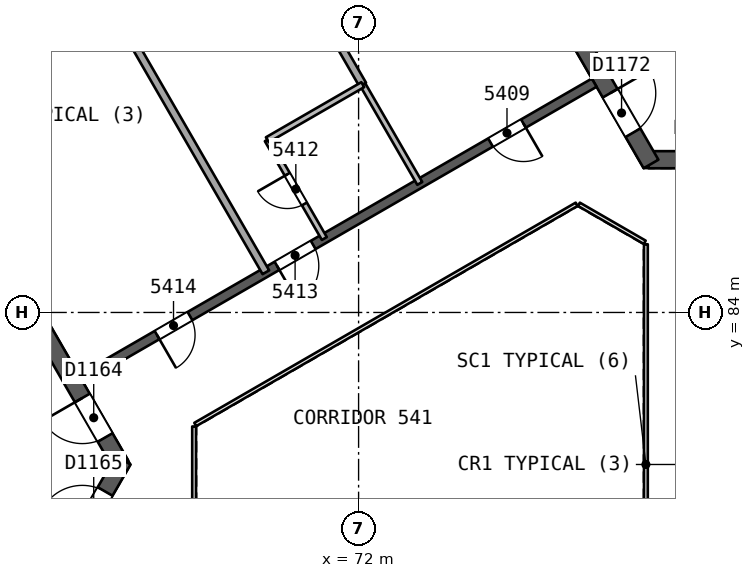
"""IFC4 building model, lengths in metres.
Left out: names, types, materials, properties, quantities, classifications, styles, units other than length and angle.
Written with IfcOpenShell. Run it as: python <this file> out.ifc"""

import sys

from ifc_helpers import new_model, si_unit, direction, frame, frame_2d, origin, place, context, subcontext, project, spatial, rectangle, extrude, element, fill, save


model = new_model("IFC4")
c1 = context("Model", 3, precision=1e-05, world=origin(), true_north=direction((0.0, 1.0)))
c2 = subcontext(c1, "Body", "Model", "MODEL_VIEW")
j1 = project(units=[si_unit("LENGTHUNIT", "METRE"), si_unit("PLANEANGLEUNIT", "RADIAN")], contexts=[c1])
p1 = place(None, origin())
s1 = spatial("IfcSite", under=j1, at=p1, CompositionType="ELEMENT")
p2 = place(p1, origin())
s2 = spatial("IfcBuilding", under=s1, at=p2, CompositionType="ELEMENT")
p3 = place(p2, frame((0.0, 0.0, 220.6)))
s3 = spatial("IfcBuildingStorey", under=s2, at=p3, CompositionType="ELEMENT", Elevation=220.6)
p4 = place(p3, frame((65.74, 80.0, 0.0), z_axis=(0.0, 0.0, 1.0), x_axis=(-0.499991857942, 0.866030104553, 0.0)))
e1 = element("IfcWall", 1, at=p4, inside=s3, PredefinedType="SHEAR", context=c2, shape_type="SweptSolid", body=[
    extrude(rectangle(XDim=10.25, YDim=0.45, at=frame_2d((5.125, 0.0))), origin(), (0.0, 0.0, 1.0), 3.7),
])
p5 = place(p4, frame((0.82, 0.0, 0.0)))
e2 = element("IfcOpeningElement", 2, at=p5, cuts=e1, PredefinedType="OPENING", context=c2, shape_type="SweptSolid", body=[
    extrude(rectangle(XDim=1.2, YDim=2.1, at=frame_2d((0.6, 1.05))), frame((0.0, 0.235, 0.0), z_axis=(0.0, -1.0, 0.0), x_axis=(1.0, 0.0, 0.0)), (0.0, 0.0, 1.0), 0.471),
])
p6 = place(p3, frame((60.728, 71.318, 0.0), z_axis=(0.0, 0.0, 1.0), x_axis=(0.500012416173, 0.866018235185, 0.0)))
e3 = element("IfcWall", 3, at=p6, inside=s3, PredefinedType="SHEAR", context=c2, shape_type="SweptSolid", body=[
    extrude(rectangle(XDim=10.155, YDim=0.45, at=frame_2d((5.078, 0.0))), origin(), (0.0, 0.0, 1.0), 3.7),
])
p7 = place(p6, frame((8.005, 0.0, 0.0)))
e4 = element("IfcOpeningElement", 4, at=p7, cuts=e3, PredefinedType="OPENING", context=c2, shape_type="SweptSolid", body=[
    extrude(rectangle(XDim=1.2, YDim=2.1, at=frame_2d((0.6, 1.05))), frame((0.0, 0.235, 0.0), z_axis=(0.0, -1.0, 0.0), x_axis=(1.0, 0.0, 0.0)), (0.0, 0.0, 1.0), 0.471),
])
p8 = place(p3, frame((79.63, 88.019, 0.0), z_axis=(0.0, 0.0, 1.0), x_axis=(1.0, 0.0, 0.0)))
e5 = element("IfcWall", 5, at=p8, inside=s3, PredefinedType="SHEAR", context=c2, shape_type="SweptSolid", body=[
    extrude(rectangle(XDim=10.25, YDim=0.45, at=frame_2d((5.125, 0.0))), origin(), (0.0, 0.0, 1.0), 3.7),
])
p9 = place(p8, frame((0.82, 0.0, 0.0)))
e6 = element("IfcOpeningElement", 6, at=p9, cuts=e5, PredefinedType="OPENING", context=c2, shape_type="SweptSolid", body=[
    extrude(rectangle(XDim=1.2, YDim=2.1, at=frame_2d((0.6, 1.05))), frame((0.0, 0.235, 0.0), z_axis=(0.0, -1.0, 0.0), x_axis=(1.0, 0.0, 0.0)), (0.0, 0.0, 1.0), 0.471),
])
p10 = place(p3, frame((74.617, 96.701, 0.0), z_axis=(0.0, 0.0, 1.0), x_axis=(0.499994385119, -0.866028645513, 0.0)))
e7 = element("IfcWall", 7, at=p10, inside=s3, PredefinedType="SHEAR", context=c2, shape_type="SweptSolid", body=[
    extrude(rectangle(XDim=10.155, YDim=0.45, at=frame_2d((5.077, 0.0))), origin(), (0.0, 0.0, 1.0), 3.7),
])
p11 = place(p10, frame((8.005, 0.0, 0.0)))
e8 = element("IfcOpeningElement", 8, at=p11, cuts=e7, PredefinedType="OPENING", context=c2, shape_type="SweptSolid", body=[
    extrude(rectangle(XDim=1.2, YDim=2.1, at=frame_2d((0.6, 1.05))), frame((0.0, 0.235, 0.0), z_axis=(0.0, -1.0, 0.0), x_axis=(1.0, 0.0, 0.0)), (0.0, 0.0, 1.0), 0.471),
])
p12 = place(p3, frame((78.2, 90.046, 0.0), z_axis=(0.0, 0.0, 1.0), x_axis=(-0.866026492143, -0.499998114903, 0.0)))
e9 = element("IfcWall", 9, at=p12, inside=s3, PredefinedType="SHEAR", context=c2, shape_type="SweptSolid", body=[
    extrude(rectangle(XDim=15.588, YDim=0.25, at=frame_2d((7.794, 0.0))), origin(), (0.0, 0.0, 1.0), 3.3),
])
p13 = place(p12, frame((2.15, 0.0, 0.0)))
e10 = element("IfcOpeningElement", 10, at=p13, cuts=e9, PredefinedType="OPENING", context=c2, shape_type="SweptSolid", body=[
    extrude(rectangle(XDim=1.0, YDim=2.1, at=frame_2d((0.5, 1.05))), frame((0.0, 0.135, 0.0), z_axis=(0.0, -1.0, 0.0), x_axis=(1.0, 0.0, 0.0)), (0.0, 0.0, 1.0), 0.271),
])
p14 = place(p12, frame((8.538, 0.0, 0.0)))
e11 = element("IfcOpeningElement", 11, at=p14, cuts=e9, PredefinedType="OPENING", context=c2, shape_type="SweptSolid", body=[
    extrude(rectangle(XDim=1.1, YDim=2.1, at=frame_2d((0.55, 1.05))), frame((0.0, 0.135, 0.0), z_axis=(0.0, -1.0, 0.0), x_axis=(1.0, 0.0, 0.0)), (0.0, 0.0, 1.0), 0.271),
])
p15 = place(p12, frame((12.282, 0.0, 0.0)))
e12 = element("IfcOpeningElement", 12, at=p15, cuts=e9, PredefinedType="OPENING", context=c2, shape_type="SweptSolid", body=[
    extrude(rectangle(XDim=1.0, YDim=2.1, at=frame_2d((0.5, 1.05))), frame((0.0, 0.135, 0.0), z_axis=(0.0, -1.0, 0.0), x_axis=(1.0, 0.0, 0.0)), (0.0, 0.0, 1.0), 0.271),
])
p16 = place(p3, frame((68.408, 96.405, 0.0), z_axis=(0.0, 0.0, 1.0), x_axis=(0.500019340035, -0.866014237522, 0.0)))
e13 = element("IfcWall", 13, at=p16, inside=s3, PredefinedType="PARTITIONING", context=c2, shape_type="SweptSolid", body=[
    extrude(rectangle(XDim=7.403, YDim=0.2, at=frame_2d((3.702, 0.0))), origin(), (0.0, 0.0, 1.0), 3.3),
])
p17 = place(p3, frame((72.11, 89.994, 0.0), z_axis=(0.0, 0.0, 1.0), x_axis=(0.499990139034, -0.866031096941, 0.0)))
e14 = element("IfcWall", 14, at=p17, inside=s3, PredefinedType="PARTITIONING", context=c2, shape_type="SweptSolid", body=[
    extrude(rectangle(XDim=3.0, YDim=0.15, at=frame_2d((1.5, 0.0))), origin(), (0.0, 0.0, 1.0), 3.3),
])
p18 = place(p3, frame((71.099, 85.946, 0.0), z_axis=(0.0, 0.0, 1.0), x_axis=(-0.499990139034, 0.866031096941, 0.0)))
e15 = element("IfcWall", 15, at=p18, inside=s3, PredefinedType="PARTITIONING", context=c2, shape_type="SweptSolid", body=[
    extrude(rectangle(XDim=3.0, YDim=0.15, at=frame_2d((1.5, 0.0))), origin(), (0.0, 0.0, 1.0), 3.3),
])
p19 = place(p18, frame((1.05, 0.0, 0.0)))
e16 = element("IfcOpeningElement", 16, at=p19, cuts=e15, PredefinedType="OPENING", context=c2, shape_type="SweptSolid", body=[
    extrude(rectangle(XDim=0.9, YDim=2.1, at=frame_2d((0.45, 1.05))), frame((0.0, 0.085, 0.0), z_axis=(0.0, -1.0, 0.0), x_axis=(1.0, 0.0, 0.0)), (0.0, 0.0, 1.0), 0.171),
])
p20 = place(p3, frame((69.599, 88.544, 0.0), z_axis=(0.0, 0.0, 1.0), x_axis=(0.866032775405, 0.499987231761, 0.0)))
e17 = element("IfcWall", 17, at=p20, inside=s3, PredefinedType="PARTITIONING", context=c2, shape_type="SweptSolid", body=[
    extrude(rectangle(XDim=2.9, YDim=0.15, at=frame_2d((1.45, 0.0))), origin(), (0.0, 0.0, 1.0), 3.3),
])
p21 = place(p3, frame((64.358, 94.067, 0.0), z_axis=(0.0, 0.0, 1.0), x_axis=(0.500010919066, -0.866019099567, 0.0)))
e18 = element("IfcWall", 18, at=p21, inside=s3, PredefinedType="PARTITIONING", context=c2, shape_type="SweptSolid", body=[
    extrude(rectangle(XDim=10.403, YDim=0.2, at=frame_2d((5.202, 0.0))), origin(), (0.0, 0.0, 1.0), 3.3),
])
p22 = place(p3, frame((44.193, 82.596, 0.0), z_axis=(0.0, 0.0, 1.0), x_axis=(0.866024521231, 0.500001528624, 0.0)))
e19 = element("IfcWall", 19, at=p22, inside=s3, PredefinedType="SOLIDWALL", context=c2, shape_type="SweptSolid", body=[
    extrude(rectangle(XDim=50.762, YDim=0.3, at=frame_2d((25.381, 0.0))), origin(), (0.0, 0.0, 1.0), 3.3),
])
p23 = place(p22, frame((24.337, 0.0, 0.0)))
e20 = element("IfcOpeningElement", 20, at=p23, cuts=e19, PredefinedType="OPENING", context=c2, shape_type="SweptSolid", body=[
    extrude(rectangle(XDim=2.4, YDim=2.4, at=frame_2d((1.2, 1.2))), frame((0.0, 0.161, 0.0), z_axis=(0.0, -1.0, 0.0), x_axis=(1.0, 0.0, 0.0)), (0.0, 0.0, 1.0), 0.321),
])
p24 = place(p22, frame((29.325, 0.0, 0.0)))
e21 = element("IfcOpeningElement", 21, at=p24, cuts=e19, PredefinedType="OPENING", context=c2, shape_type="SweptSolid", body=[
    extrude(rectangle(XDim=2.4, YDim=2.4, at=frame_2d((1.2, 1.2))), frame((0.0, 0.161, 0.0), z_axis=(0.0, -1.0, 0.0), x_axis=(1.0, 0.0, 0.0)), (0.0, 0.0, 1.0), 0.321),
])
p25 = place(p22, frame((39.492, 0.0, 0.0)))
e22 = element("IfcOpeningElement", 22, at=p25, cuts=e19, PredefinedType="OPENING", context=c2, shape_type="SweptSolid", body=[
    extrude(rectangle(XDim=2.4, YDim=2.4, at=frame_2d((1.2, 1.2))), frame((0.0, 0.161, 0.0), z_axis=(0.0, -1.0, 0.0), x_axis=(1.0, 0.0, 0.0)), (0.0, 0.0, 1.0), 0.321),
])
p26 = place(p22, frame((19.193, 0.0, 0.0)))
e23 = element("IfcOpeningElement", 23, at=p26, cuts=e19, PredefinedType="OPENING", context=c2, shape_type="SweptSolid", body=[
    extrude(rectangle(XDim=2.4, YDim=2.4, at=frame_2d((1.2, 1.2))), frame((0.0, 0.161, 0.0), z_axis=(0.0, -1.0, 0.0), x_axis=(1.0, 0.0, 0.0)), (0.0, 0.0, 1.0), 0.321),
])
p27 = place(p22, frame((8.878, 0.0, 0.0)))
e24 = element("IfcOpeningElement", 24, at=p27, cuts=e19, PredefinedType="OPENING", context=c2, shape_type="SweptSolid", body=[
    extrude(rectangle(XDim=2.4, YDim=2.4, at=frame_2d((1.2, 1.2))), frame((0.0, 0.161, 0.0), z_axis=(0.0, -1.0, 0.0), x_axis=(1.0, 0.0, 0.0)), (0.0, 0.0, 1.0), 0.321),
])
p28 = place(p3, frame((86.77, 89.486, 0.0), z_axis=(0.0, 0.0, 1.0), x_axis=(-0.86601811187, 0.500012629753, 0.0)))
e25 = element("IfcWall", 25, at=p28, inside=s3, PredefinedType="SOLIDWALL", context=c2, shape_type="SweptSolid", body=[
    extrude(rectangle(XDim=10.9, YDim=0.2, at=frame_2d((5.45, 0.0))), origin(), (0.0, 0.0, 1.0), 3.3),
])
p29 = place(p28, frame((0.625, 0.0, 0.0)))
e26 = element("IfcOpeningElement", 26, at=p29, cuts=e25, PredefinedType="OPENING", context=c2, shape_type="SweptSolid", body=[
    extrude(rectangle(XDim=1.0, YDim=2.1, at=frame_2d((0.5, 1.05))), frame((0.0, 0.11, 0.0), z_axis=(0.0, -1.0, 0.0), x_axis=(1.0, 0.0, 0.0)), (0.0, 0.0, 1.0), 0.221),
])
p30 = place(p28, frame((2.875, 0.0, 0.0)))
e27 = element("IfcOpeningElement", 27, at=p30, cuts=e25, PredefinedType="OPENING", context=c2, shape_type="SweptSolid", body=[
    extrude(rectangle(XDim=1.0, YDim=2.1, at=frame_2d((0.5, 1.05))), frame((0.0, 0.11, 0.0), z_axis=(0.0, -1.0, 0.0), x_axis=(1.0, 0.0, 0.0)), (0.0, 0.0, 1.0), 0.221),
])
p31 = place(p28, frame((6.25, 0.0, 0.0)))
e28 = element("IfcOpeningElement", 28, at=p31, cuts=e25, PredefinedType="OPENING", context=c2, shape_type="SweptSolid", body=[
    extrude(rectangle(XDim=1.0, YDim=2.1, at=frame_2d((0.5, 1.05))), frame((0.0, 0.11, 0.0), z_axis=(0.0, -1.0, 0.0), x_axis=(1.0, 0.0, 0.0)), (0.0, 0.0, 1.0), 0.221),
])
p32 = place(p3, frame((89.43, 90.814, 0.0), z_axis=(0.0, 0.0, 1.0), x_axis=(-0.866018983788, 0.500011119594, 0.0)))
e29 = element("IfcWall", 29, at=p32, inside=s3, PredefinedType="SOLIDWALL", context=c2, shape_type="SweptSolid", body=[
    extrude(rectangle(XDim=10.64, YDim=0.2, at=frame_2d((5.32, 0.0))), origin(), (0.0, 0.0, 1.0), 3.3),
])
p33 = place(p32, frame((0.37, 0.0, 0.0)))
e30 = element("IfcOpeningElement", 30, at=p33, cuts=e29, PredefinedType="OPENING", context=c2, shape_type="SweptSolid", body=[
    extrude(rectangle(XDim=0.9, YDim=2.1, at=frame_2d((0.45, 1.05))), frame((0.0, 0.11, 0.0), z_axis=(0.0, -1.0, 0.0), x_axis=(1.0, 0.0, 0.0)), (0.0, 0.0, 1.0), 0.221),
])
p34 = place(p3, frame((79.56, 74.206, 0.0), z_axis=(0.0, 0.0, 1.0), x_axis=(0.0, 1.0, 0.0)))
e31 = element("IfcWall", 31, at=p34, inside=s3, PredefinedType="PARTITIONING", context=c2, shape_type="SweptSolid", body=[
    extrude(rectangle(XDim=11.588, YDim=0.1, at=frame_2d((5.794, 0.0))), origin(), (0.0, 0.0, 1.0), 3.3),
])
p35 = place(p3, frame((79.53, 85.846, 0.0), z_axis=(0.0, 0.0, 1.0), x_axis=(-0.866041268327, 0.499972520799, 0.0)))
e32 = element("IfcWall", 32, at=p35, inside=s3, PredefinedType="PARTITIONING", context=c2, shape_type="SweptSolid", body=[
    extrude(rectangle(XDim=2.0, YDim=0.1, at=frame_2d((1.0, 0.0))), origin(), (0.0, 0.0, 1.0), 3.3),
])
p36 = place(p3, frame((77.738, 86.846, 0.0), z_axis=(0.0, 0.0, 1.0), x_axis=(-0.866026658274, -0.499997827154, 0.0)))
e33 = element("IfcWall", 33, at=p36, inside=s3, PredefinedType="PARTITIONING", context=c2, shape_type="SweptSolid", body=[
    extrude(rectangle(XDim=11.588, YDim=0.1, at=frame_2d((5.794, 0.0))), origin(), (0.0, 0.0, 1.0), 3.3),
])
p37 = place(p3, frame((67.672, 81.0, 0.0), z_axis=(0.0, 0.0, 1.0), x_axis=(0.0, -1.0, 0.0)))
e34 = element("IfcWall", 34, at=p37, inside=s3, PredefinedType="PARTITIONING", context=c2, shape_type="SweptSolid", body=[
    extrude(rectangle(XDim=2.0, YDim=0.1, at=frame_2d((1.0, 0.0))), origin(), (0.0, 0.0, 1.0), 3.3),
])
p38 = place(p13, origin())
e35 = element("IfcDoor", 35, at=p38, inside=s3, OperationType="SINGLE_SWING_LEFT", PredefinedType="NOTDEFINED", context=c2, shape_type="SweptSolid", body=[
    extrude(rectangle(XDim=1.0, YDim=2.1, at=frame_2d((0.5, 1.05))), frame((0.0, 0.025, 0.0), z_axis=(0.0, -1.0, 0.0), x_axis=(1.0, 0.0, 0.0)), (0.0, 0.0, 1.0), 0.05),
])
fill(e10, e35)
p39 = place(p19, origin())
e36 = element("IfcDoor", 36, at=p39, inside=s3, OperationType="SINGLE_SWING_RIGHT", PredefinedType="NOTDEFINED", context=c2, shape_type="SweptSolid", body=[
    extrude(rectangle(XDim=0.9, YDim=2.1, at=frame_2d((0.45, 1.05))), frame((0.0, 0.025, 0.0), z_axis=(0.0, -1.0, 0.0), x_axis=(1.0, 0.0, 0.0)), (0.0, 0.0, 1.0), 0.05),
])
fill(e16, e36)
p40 = place(p14, origin())
e37 = element("IfcDoor", 37, at=p40, inside=s3, OperationType="SINGLE_SWING_RIGHT", PredefinedType="NOTDEFINED", context=c2, shape_type="SweptSolid", body=[
    extrude(rectangle(XDim=1.1, YDim=2.1, at=frame_2d((0.55, 1.05))), frame((0.0, 0.025, 0.0), z_axis=(0.0, -1.0, 0.0), x_axis=(1.0, 0.0, 0.0)), (0.0, 0.0, 1.0), 0.05),
])
fill(e11, e37)
p41 = place(p15, origin())
e38 = element("IfcDoor", 38, at=p41, inside=s3, OperationType="SINGLE_SWING_RIGHT", PredefinedType="NOTDEFINED", context=c2, shape_type="SweptSolid", body=[
    extrude(rectangle(XDim=1.0, YDim=2.1, at=frame_2d((0.5, 1.05))), frame((0.0, 0.025, 0.0), z_axis=(0.0, -1.0, 0.0), x_axis=(1.0, 0.0, 0.0)), (0.0, 0.0, 1.0), 0.05),
])
fill(e12, e38)
p42 = place(p5, origin())
e39 = element("IfcDoor", 39, at=p42, inside=s3, OperationType="SINGLE_SWING_RIGHT", PredefinedType="NOTDEFINED", context=c2, shape_type="SweptSolid", body=[
    extrude(rectangle(XDim=1.2, YDim=2.1, at=frame_2d((0.6, 1.05))), frame((0.0, 0.025, 0.0), z_axis=(0.0, -1.0, 0.0), x_axis=(1.0, 0.0, 0.0)), (0.0, 0.0, 1.0), 0.05),
])
fill(e2, e39)
p43 = place(p7, origin())
e40 = element("IfcDoor", 40, at=p43, inside=s3, OperationType="SINGLE_SWING_LEFT", PredefinedType="NOTDEFINED", context=c2, shape_type="SweptSolid", body=[
    extrude(rectangle(XDim=1.2, YDim=2.1, at=frame_2d((0.6, 1.05))), frame((0.0, 0.025, 0.0), z_axis=(0.0, -1.0, 0.0), x_axis=(1.0, 0.0, 0.0)), (0.0, 0.0, 1.0), 0.05),
])
fill(e4, e40)
p44 = place(p11, origin())
e41 = element("IfcDoor", 41, at=p44, inside=s3, OperationType="SINGLE_SWING_LEFT", PredefinedType="NOTDEFINED", context=c2, shape_type="SweptSolid", body=[
    extrude(rectangle(XDim=1.2, YDim=2.1, at=frame_2d((0.6, 1.05))), frame((0.0, 0.025, 0.0), z_axis=(0.0, -1.0, 0.0), x_axis=(1.0, 0.0, 0.0)), (0.0, 0.0, 1.0), 0.05),
])
fill(e8, e41)
save(model, sys.argv[1])
